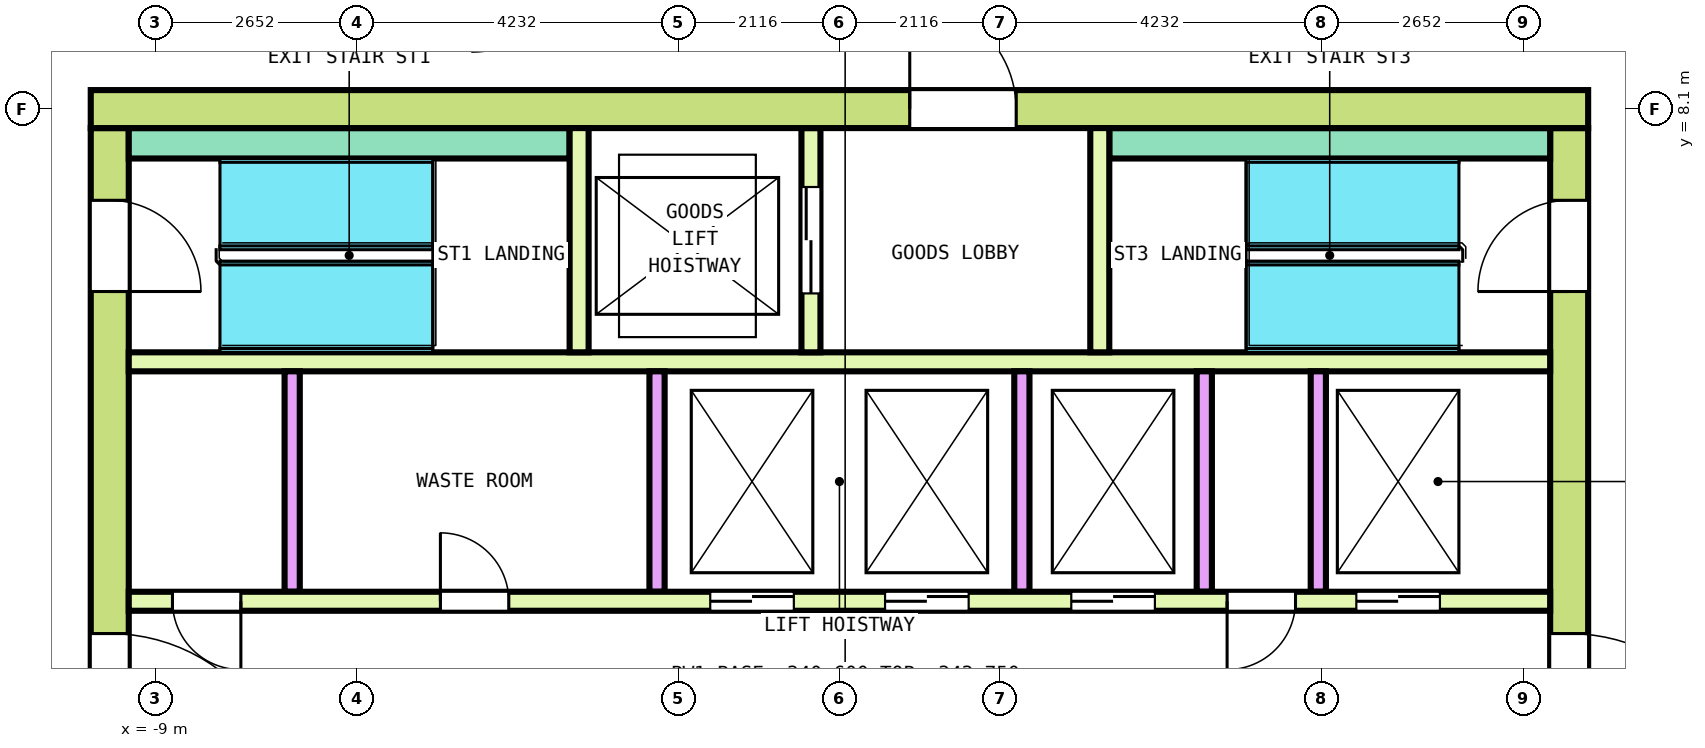
"""IFC4 building model, lengths in metres.
Left out: names, types, materials, properties, quantities, classifications, styles, units other than length and angle.
Written with IfcOpenShell. Run it as: python <this file> out.ifc"""

import sys

from ifc_helpers import new_model, si_unit, direction, frame, frame_2d, origin, place, context, subcontext, project, spatial, rectangle, extrude, element, fill, save


model = new_model("IFC4")
c1 = context("Model", 3, precision=1e-05, world=origin(), true_north=direction((0.0, 1.0)))
c2 = subcontext(c1, "Body", "Model", "MODEL_VIEW")
j1 = project(units=[si_unit("LENGTHUNIT", "METRE"), si_unit("PLANEANGLEUNIT", "RADIAN")], contexts=[c1])
p1 = place(None, origin())
s1 = spatial("IfcSite", under=j1, at=p1, CompositionType="ELEMENT")
p2 = place(p1, origin())
s2 = spatial("IfcBuilding", under=s1, at=p2, CompositionType="ELEMENT")
p3 = place(p2, frame((0.0, 0.0, 340.6)))
s3 = spatial("IfcBuildingStorey", under=s2, at=p3, CompositionType="ELEMENT", Elevation=340.6)
p4 = place(p3, frame((-9.85, 8.1, 0.0), z_axis=(0.0, 0.0, 1.0), x_axis=(1.0, 0.0, 0.0)))
e1 = element("IfcWall", 1, at=p4, inside=s3, PredefinedType="SHEAR", context=c2, shape_type="SweptSolid", body=[
    extrude(rectangle(XDim=19.7, YDim=0.5, at=frame_2d((9.85, 0.0))), origin(), (0.0, 0.0, 1.0), 3.8),
])
p5 = place(p4, frame((10.775, 0.0, 0.0)))
e2 = element("IfcOpeningElement", 2, at=p5, cuts=e1, PredefinedType="OPENING", context=c2, shape_type="SweptSolid", body=[
    extrude(rectangle(XDim=1.4, YDim=2.1, at=frame_2d((0.7, 1.05))), frame((0.0, 0.26, 0.0), z_axis=(0.0, -1.0, 0.0), x_axis=(1.0, 0.0, 0.0)), (0.0, 0.0, 1.0), 0.52),
])
p6 = place(p3, frame((-9.6, -7.85, 0.0), z_axis=(0.0, 0.0, 1.0), x_axis=(0.0, 1.0, 0.0)))
e3 = element("IfcWall", 3, at=p6, inside=s3, PredefinedType="SHEAR", context=c2, shape_type="SweptSolid", body=[
    extrude(rectangle(XDim=15.7, YDim=0.5, at=frame_2d((7.85, 0.0))), origin(), (0.0, 0.0, 1.0), 3.8),
])
p7 = place(p6, frame((6.65, 0.0, 0.0)))
e4 = element("IfcOpeningElement", 4, at=p7, cuts=e3, PredefinedType="OPENING", context=c2, shape_type="SweptSolid", body=[
    extrude(rectangle(XDim=2.4, YDim=2.1, at=frame_2d((1.2, 1.05))), frame((0.0, 0.26, 0.0), z_axis=(0.0, -1.0, 0.0), x_axis=(1.0, 0.0, 0.0)), (0.0, 0.0, 1.0), 0.52),
])
p8 = place(p6, frame((13.55, 0.0, 0.0)))
e5 = element("IfcOpeningElement", 5, at=p8, cuts=e3, PredefinedType="OPENING", context=c2, shape_type="SweptSolid", body=[
    extrude(rectangle(XDim=1.2, YDim=2.1, at=frame_2d((0.6, 1.05))), frame((0.0, 0.26, 0.0), z_axis=(0.0, -1.0, 0.0), x_axis=(1.0, 0.0, 0.0)), (0.0, 0.0, 1.0), 0.52),
])
p9 = place(p6, frame((0.95, 0.0, 0.0)))
e6 = element("IfcOpeningElement", 6, at=p9, cuts=e3, PredefinedType="OPENING", context=c2, shape_type="SweptSolid", body=[
    extrude(rectangle(XDim=1.2, YDim=2.1, at=frame_2d((0.6, 1.05))), frame((0.0, 0.26, 0.0), z_axis=(0.0, -1.0, 0.0), x_axis=(1.0, 0.0, 0.0)), (0.0, 0.0, 1.0), 0.52),
])
p10 = place(p3, frame((9.6, -7.85, 0.0), z_axis=(0.0, 0.0, 1.0), x_axis=(0.0, 1.0, 0.0)))
e7 = element("IfcWall", 7, at=p10, inside=s3, PredefinedType="SHEAR", context=c2, shape_type="SweptSolid", body=[
    extrude(rectangle(XDim=15.7, YDim=0.5, at=frame_2d((7.85, 0.0))), origin(), (0.0, 0.0, 1.0), 3.8),
])
p11 = place(p10, frame((6.65, 0.0, 0.0)))
e8 = element("IfcOpeningElement", 8, at=p11, cuts=e7, PredefinedType="OPENING", context=c2, shape_type="SweptSolid", body=[
    extrude(rectangle(XDim=2.4, YDim=2.1, at=frame_2d((1.2, 1.05))), frame((0.0, 0.26, 0.0), z_axis=(0.0, -1.0, 0.0), x_axis=(1.0, 0.0, 0.0)), (0.0, 0.0, 1.0), 0.52),
])
p12 = place(p10, frame((13.55, 0.0, 0.0)))
e9 = element("IfcOpeningElement", 9, at=p12, cuts=e7, PredefinedType="OPENING", context=c2, shape_type="SweptSolid", body=[
    extrude(rectangle(XDim=1.2, YDim=2.1, at=frame_2d((0.6, 1.05))), frame((0.0, 0.26, 0.0), z_axis=(0.0, -1.0, 0.0), x_axis=(1.0, 0.0, 0.0)), (0.0, 0.0, 1.0), 0.52),
])
p13 = place(p10, frame((1.05, 0.0, 0.0)))
e10 = element("IfcOpeningElement", 10, at=p13, cuts=e7, PredefinedType="OPENING", context=c2, shape_type="SweptSolid", body=[
    extrude(rectangle(XDim=1.0, YDim=2.1, at=frame_2d((0.5, 1.05))), frame((0.0, 0.26, 0.0), z_axis=(0.0, -1.0, 0.0), x_axis=(1.0, 0.0, 0.0)), (0.0, 0.0, 1.0), 0.52),
])
p14 = place(p3, frame((-9.35, 1.625, 0.0), z_axis=(0.0, 0.0, 1.0), x_axis=(1.0, 0.0, 0.0)))
e11 = element("IfcWall", 11, at=p14, inside=s3, PredefinedType="SOLIDWALL", context=c2, shape_type="SweptSolid", body=[
    extrude(rectangle(XDim=18.7, YDim=0.25, at=frame_2d((9.35, 0.0))), origin(), (0.0, 0.0, 1.0), 3.8),
])
p15 = place(p14, frame((7.65, 0.0, 0.0)))
e12 = element("IfcOpeningElement", 12, at=p15, cuts=e11, PredefinedType="OPENING", context=c2, shape_type="SweptSolid", body=[
    extrude(rectangle(XDim=1.1, YDim=2.1, at=frame_2d((0.55, 1.05))), frame((0.0, 0.135, 0.0), z_axis=(0.0, -1.0, 0.0), x_axis=(1.0, 0.0, 0.0)), (0.0, 0.0, 1.0), 0.27),
])
p16 = place(p14, frame((9.95, 0.0, 0.0)))
e13 = element("IfcOpeningElement", 13, at=p16, cuts=e11, PredefinedType="OPENING", context=c2, shape_type="SweptSolid", body=[
    extrude(rectangle(XDim=1.1, YDim=2.1, at=frame_2d((0.55, 1.05))), frame((0.0, 0.135, 0.0), z_axis=(0.0, -1.0, 0.0), x_axis=(1.0, 0.0, 0.0)), (0.0, 0.0, 1.0), 0.27),
])
p17 = place(p14, frame((12.4, 0.0, 0.0)))
e14 = element("IfcOpeningElement", 14, at=p17, cuts=e11, PredefinedType="OPENING", context=c2, shape_type="SweptSolid", body=[
    extrude(rectangle(XDim=1.1, YDim=2.1, at=frame_2d((0.55, 1.05))), frame((0.0, 0.135, 0.0), z_axis=(0.0, -1.0, 0.0), x_axis=(1.0, 0.0, 0.0)), (0.0, 0.0, 1.0), 0.27),
])
p18 = place(p14, frame((16.15, 0.0, 0.0)))
e15 = element("IfcOpeningElement", 15, at=p18, cuts=e11, PredefinedType="OPENING", context=c2, shape_type="SweptSolid", body=[
    extrude(rectangle(XDim=1.1, YDim=2.1, at=frame_2d((0.55, 1.05))), frame((0.0, 0.135, 0.0), z_axis=(0.0, -1.0, 0.0), x_axis=(1.0, 0.0, 0.0)), (0.0, 0.0, 1.0), 0.27),
])
p19 = place(p14, frame((0.575, 0.0, 0.0)))
e16 = element("IfcOpeningElement", 16, at=p19, cuts=e11, PredefinedType="OPENING", context=c2, shape_type="SweptSolid", body=[
    extrude(rectangle(XDim=0.9, YDim=2.1, at=frame_2d((0.45, 1.05))), frame((0.0, 0.135, 0.0), z_axis=(0.0, -1.0, 0.0), x_axis=(1.0, 0.0, 0.0)), (0.0, 0.0, 1.0), 0.27),
])
p20 = place(p14, frame((4.1, 0.0, 0.0)))
e17 = element("IfcOpeningElement", 17, at=p20, cuts=e11, PredefinedType="OPENING", context=c2, shape_type="SweptSolid", body=[
    extrude(rectangle(XDim=0.9, YDim=2.1, at=frame_2d((0.45, 1.05))), frame((0.0, 0.135, 0.0), z_axis=(0.0, -1.0, 0.0), x_axis=(1.0, 0.0, 0.0)), (0.0, 0.0, 1.0), 0.27),
])
p21 = place(p14, frame((14.45, 0.0, 0.0)))
e18 = element("IfcOpeningElement", 18, at=p21, cuts=e11, PredefinedType="OPENING", context=c2, shape_type="SweptSolid", body=[
    extrude(rectangle(XDim=0.9, YDim=2.1, at=frame_2d((0.45, 1.05))), frame((0.0, 0.135, 0.0), z_axis=(0.0, -1.0, 0.0), x_axis=(1.0, 0.0, 0.0)), (0.0, 0.0, 1.0), 0.27),
])
p22 = place(p3, frame((-9.35, 4.775, 0.0), z_axis=(0.0, 0.0, 1.0), x_axis=(1.0, 0.0, 0.0)))
e19 = element("IfcWall", 19, at=p22, inside=s3, PredefinedType="SOLIDWALL", context=c2, shape_type="SweptSolid", body=[
    extrude(rectangle(XDim=18.7, YDim=0.25, at=frame_2d((9.35, 0.0))), origin(), (0.0, 0.0, 1.0), 3.8),
])
for number, where, z_axis, x_axis in (
    (20, (-7.2, 1.75, 0.0), (0.0, 0.0, 1.0), (0.0, 1.0, 0.0)),
    (21, (-2.4, 1.75, 0.0), (0.0, 0.0, 1.0), (0.0, 1.0, 0.0)),
    (22, (2.4, 1.75, 0.0), (0.0, 0.0, 1.0), (0.0, 1.0, 0.0)),
    (23, (4.8, 1.75, 0.0), (0.0, 0.0, 1.0), (0.0, 1.0, 0.0)),
    (24, (6.3, 1.75, 0.0), (0.0, 0.0, 1.0), (0.0, 1.0, 0.0)),
):
    element("IfcWall", number, at=place(p3, frame(where, z_axis=z_axis, x_axis=x_axis)), inside=s3, PredefinedType="SOLIDWALL", context=c2, shape_type="SweptSolid", body=[
        extrude(rectangle(XDim=2.9, YDim=0.2, at=frame_2d((1.45, 0.0))), origin(), (0.0, 0.0, 1.0), 3.8),
    ])
for number, where, z_axis, x_axis in (
    (25, (-9.35, 7.65, 0.0), (0.0, 0.0, 1.0), (1.0, 0.0, 0.0)),
    (26, (3.55, 7.65, 0.0), (0.0, 0.0, 1.0), (1.0, 0.0, 0.0)),
):
    element("IfcWall", number, at=place(p3, frame(where, z_axis=z_axis, x_axis=x_axis)), inside=s3, PredefinedType="SOLIDWALL", context=c2, shape_type="SweptSolid", body=[
        extrude(rectangle(XDim=5.8, YDim=0.4, at=frame_2d((2.9, 0.0))), origin(), (0.0, 0.0, 1.0), 3.8),
    ])
p23 = place(p3, frame((-3.425, 4.9, 0.0), z_axis=(0.0, 0.0, 1.0), x_axis=(0.0, 1.0, 0.0)))
e27 = element("IfcWall", 27, at=p23, inside=s3, PredefinedType="SOLIDWALL", context=c2, shape_type="SweptSolid", body=[
    extrude(rectangle(XDim=2.95, YDim=0.25, at=frame_2d((1.475, 0.0))), origin(), (0.0, 0.0, 1.0), 3.8),
])
p24 = place(p3, frame((-0.375, 4.9, 0.0), z_axis=(0.0, 0.0, 1.0), x_axis=(0.0, 1.0, 0.0)))
e28 = element("IfcWall", 28, at=p24, inside=s3, PredefinedType="SOLIDWALL", context=c2, shape_type="SweptSolid", body=[
    extrude(rectangle(XDim=2.95, YDim=0.25, at=frame_2d((1.475, 0.0))), origin(), (0.0, 0.0, 1.0), 3.8),
])
p25 = place(p24, frame((0.775, 0.0, 0.0)))
e29 = element("IfcOpeningElement", 29, at=p25, cuts=e28, PredefinedType="OPENING", context=c2, shape_type="SweptSolid", body=[
    extrude(rectangle(XDim=1.4, YDim=2.1, at=frame_2d((0.7, 1.05))), frame((0.0, 0.135, 0.0), z_axis=(0.0, -1.0, 0.0), x_axis=(1.0, 0.0, 0.0)), (0.0, 0.0, 1.0), 0.27),
])
p26 = place(p3, frame((3.425, 4.9, 0.0), z_axis=(0.0, 0.0, 1.0), x_axis=(0.0, 1.0, 0.0)))
e30 = element("IfcWall", 30, at=p26, inside=s3, PredefinedType="SOLIDWALL", context=c2, shape_type="SweptSolid", body=[
    extrude(rectangle(XDim=2.95, YDim=0.25, at=frame_2d((1.475, 0.0))), origin(), (0.0, 0.0, 1.0), 3.8),
])
p27 = place(p15, origin())
e31 = element("IfcDoor", 31, at=p27, inside=s3, OperationType="DOUBLE_DOOR_SLIDING", PredefinedType="DOOR", context=c2, shape_type="SweptSolid", body=[
    extrude(rectangle(XDim=1.1, YDim=2.1, at=frame_2d((0.55, 1.05))), frame((0.0, 0.075, 0.0), z_axis=(0.0, -1.0, 0.0), x_axis=(1.0, 0.0, 0.0)), (0.0, 0.0, 1.0), 0.15),
])
fill(e12, e31)
p28 = place(p16, origin())
e32 = element("IfcDoor", 32, at=p28, inside=s3, OperationType="DOUBLE_DOOR_SLIDING", PredefinedType="DOOR", context=c2, shape_type="SweptSolid", body=[
    extrude(rectangle(XDim=1.1, YDim=2.1, at=frame_2d((0.55, 1.05))), frame((0.0, 0.075, 0.0), z_axis=(0.0, -1.0, 0.0), x_axis=(1.0, 0.0, 0.0)), (0.0, 0.0, 1.0), 0.15),
])
fill(e13, e32)
p29 = place(p17, origin())
e33 = element("IfcDoor", 33, at=p29, inside=s3, OperationType="DOUBLE_DOOR_SLIDING", PredefinedType="DOOR", context=c2, shape_type="SweptSolid", body=[
    extrude(rectangle(XDim=1.1, YDim=2.1, at=frame_2d((0.55, 1.05))), frame((0.0, 0.075, 0.0), z_axis=(0.0, -1.0, 0.0), x_axis=(1.0, 0.0, 0.0)), (0.0, 0.0, 1.0), 0.15),
])
fill(e14, e33)
p30 = place(p18, origin())
e34 = element("IfcDoor", 34, at=p30, inside=s3, OperationType="DOUBLE_DOOR_SLIDING", PredefinedType="DOOR", context=c2, shape_type="SweptSolid", body=[
    extrude(rectangle(XDim=1.1, YDim=2.1, at=frame_2d((0.55, 1.05))), frame((0.0, 0.075, 0.0), z_axis=(0.0, -1.0, 0.0), x_axis=(1.0, 0.0, 0.0)), (0.0, 0.0, 1.0), 0.15),
])
fill(e15, e34)
p31 = place(p25, origin())
e35 = element("IfcDoor", 35, at=p31, inside=s3, OperationType="DOUBLE_DOOR_SLIDING", PredefinedType="DOOR", context=c2, shape_type="SweptSolid", body=[
    extrude(rectangle(XDim=1.4, YDim=2.1, at=frame_2d((0.7, 1.05))), frame((0.0, 0.075, 0.0), z_axis=(0.0, -1.0, 0.0), x_axis=(1.0, 0.0, 0.0)), (0.0, 0.0, 1.0), 0.15),
])
fill(e29, e35)
p32 = place(p7, origin())
e36 = element("IfcDoor", 36, at=p32, inside=s3, OperationType="DOUBLE_DOOR_SINGLE_SWING", PredefinedType="DOOR", context=c2, shape_type="SweptSolid", body=[
    extrude(rectangle(XDim=2.4, YDim=2.1, at=frame_2d((1.2, 1.05))), frame((0.0, 0.2, 0.0), z_axis=(0.0, -1.0, 0.0), x_axis=(1.0, 0.0, 0.0)), (0.0, 0.0, 1.0), 0.4),
])
fill(e4, e36)
p33 = place(p11, origin())
e37 = element("IfcDoor", 37, at=p33, inside=s3, OperationType="DOUBLE_DOOR_SINGLE_SWING", PredefinedType="DOOR", context=c2, shape_type="SweptSolid", body=[
    extrude(rectangle(XDim=2.4, YDim=2.1, at=frame_2d((1.2, 1.05))), frame((0.0, 0.2, 0.0), z_axis=(0.0, -1.0, 0.0), x_axis=(1.0, 0.0, 0.0)), (0.0, 0.0, 1.0), 0.4),
])
fill(e8, e37)
p34 = place(p8, origin())
e38 = element("IfcDoor", 38, at=p34, inside=s3, OperationType="SINGLE_SWING_RIGHT", PredefinedType="DOOR", context=c2, shape_type="SweptSolid", body=[
    extrude(rectangle(XDim=1.2, YDim=2.1, at=frame_2d((0.6, 1.05))), frame((0.0, 0.2, 0.0), z_axis=(0.0, -1.0, 0.0), x_axis=(1.0, 0.0, 0.0)), (0.0, 0.0, 1.0), 0.4),
])
fill(e5, e38)
p35 = place(p12, origin())
e39 = element("IfcDoor", 39, at=p35, inside=s3, OperationType="SINGLE_SWING_RIGHT", PredefinedType="DOOR", context=c2, shape_type="SweptSolid", body=[
    extrude(rectangle(XDim=1.2, YDim=2.1, at=frame_2d((0.6, 1.05))), frame((0.0, 0.2, 0.0), z_axis=(0.0, -1.0, 0.0), x_axis=(1.0, 0.0, 0.0)), (0.0, 0.0, 1.0), 0.4),
])
fill(e9, e39)
p36 = place(p5, origin())
e40 = element("IfcDoor", 40, at=p36, inside=s3, OperationType="DOUBLE_DOOR_SINGLE_SWING", PredefinedType="DOOR", context=c2, shape_type="SweptSolid", body=[
    extrude(rectangle(XDim=1.4, YDim=2.1, at=frame_2d((0.7, 1.05))), frame((0.0, 0.2, 0.0), z_axis=(0.0, -1.0, 0.0), x_axis=(1.0, 0.0, 0.0)), (0.0, 0.0, 1.0), 0.4),
])
fill(e2, e40)
p37 = place(p19, origin())
e41 = element("IfcDoor", 41, at=p37, inside=s3, OperationType="SINGLE_SWING_RIGHT", PredefinedType="DOOR", context=c2, shape_type="SweptSolid", body=[
    extrude(rectangle(XDim=0.9, YDim=2.1, at=frame_2d((0.45, 1.05))), frame((0.0, 0.075, 0.0), z_axis=(0.0, -1.0, 0.0), x_axis=(1.0, 0.0, 0.0)), (0.0, 0.0, 1.0), 0.15),
])
fill(e16, e41)
p38 = place(p20, origin())
e42 = element("IfcDoor", 42, at=p38, inside=s3, OperationType="SINGLE_SWING_LEFT", PredefinedType="DOOR", context=c2, shape_type="SweptSolid", body=[
    extrude(rectangle(XDim=0.9, YDim=2.1, at=frame_2d((0.45, 1.05))), frame((0.0, 0.075, 0.0), z_axis=(0.0, -1.0, 0.0), x_axis=(1.0, 0.0, 0.0)), (0.0, 0.0, 1.0), 0.15),
])
fill(e17, e42)
p39 = place(p21, origin())
e43 = element("IfcDoor", 43, at=p39, inside=s3, OperationType="SINGLE_SWING_RIGHT", PredefinedType="DOOR", context=c2, shape_type="SweptSolid", body=[
    extrude(rectangle(XDim=0.9, YDim=2.1, at=frame_2d((0.45, 1.05))), frame((0.0, 0.075, 0.0), z_axis=(0.0, -1.0, 0.0), x_axis=(1.0, 0.0, 0.0)), (0.0, 0.0, 1.0), 0.15),
])
fill(e18, e43)
save(model, sys.argv[1])
